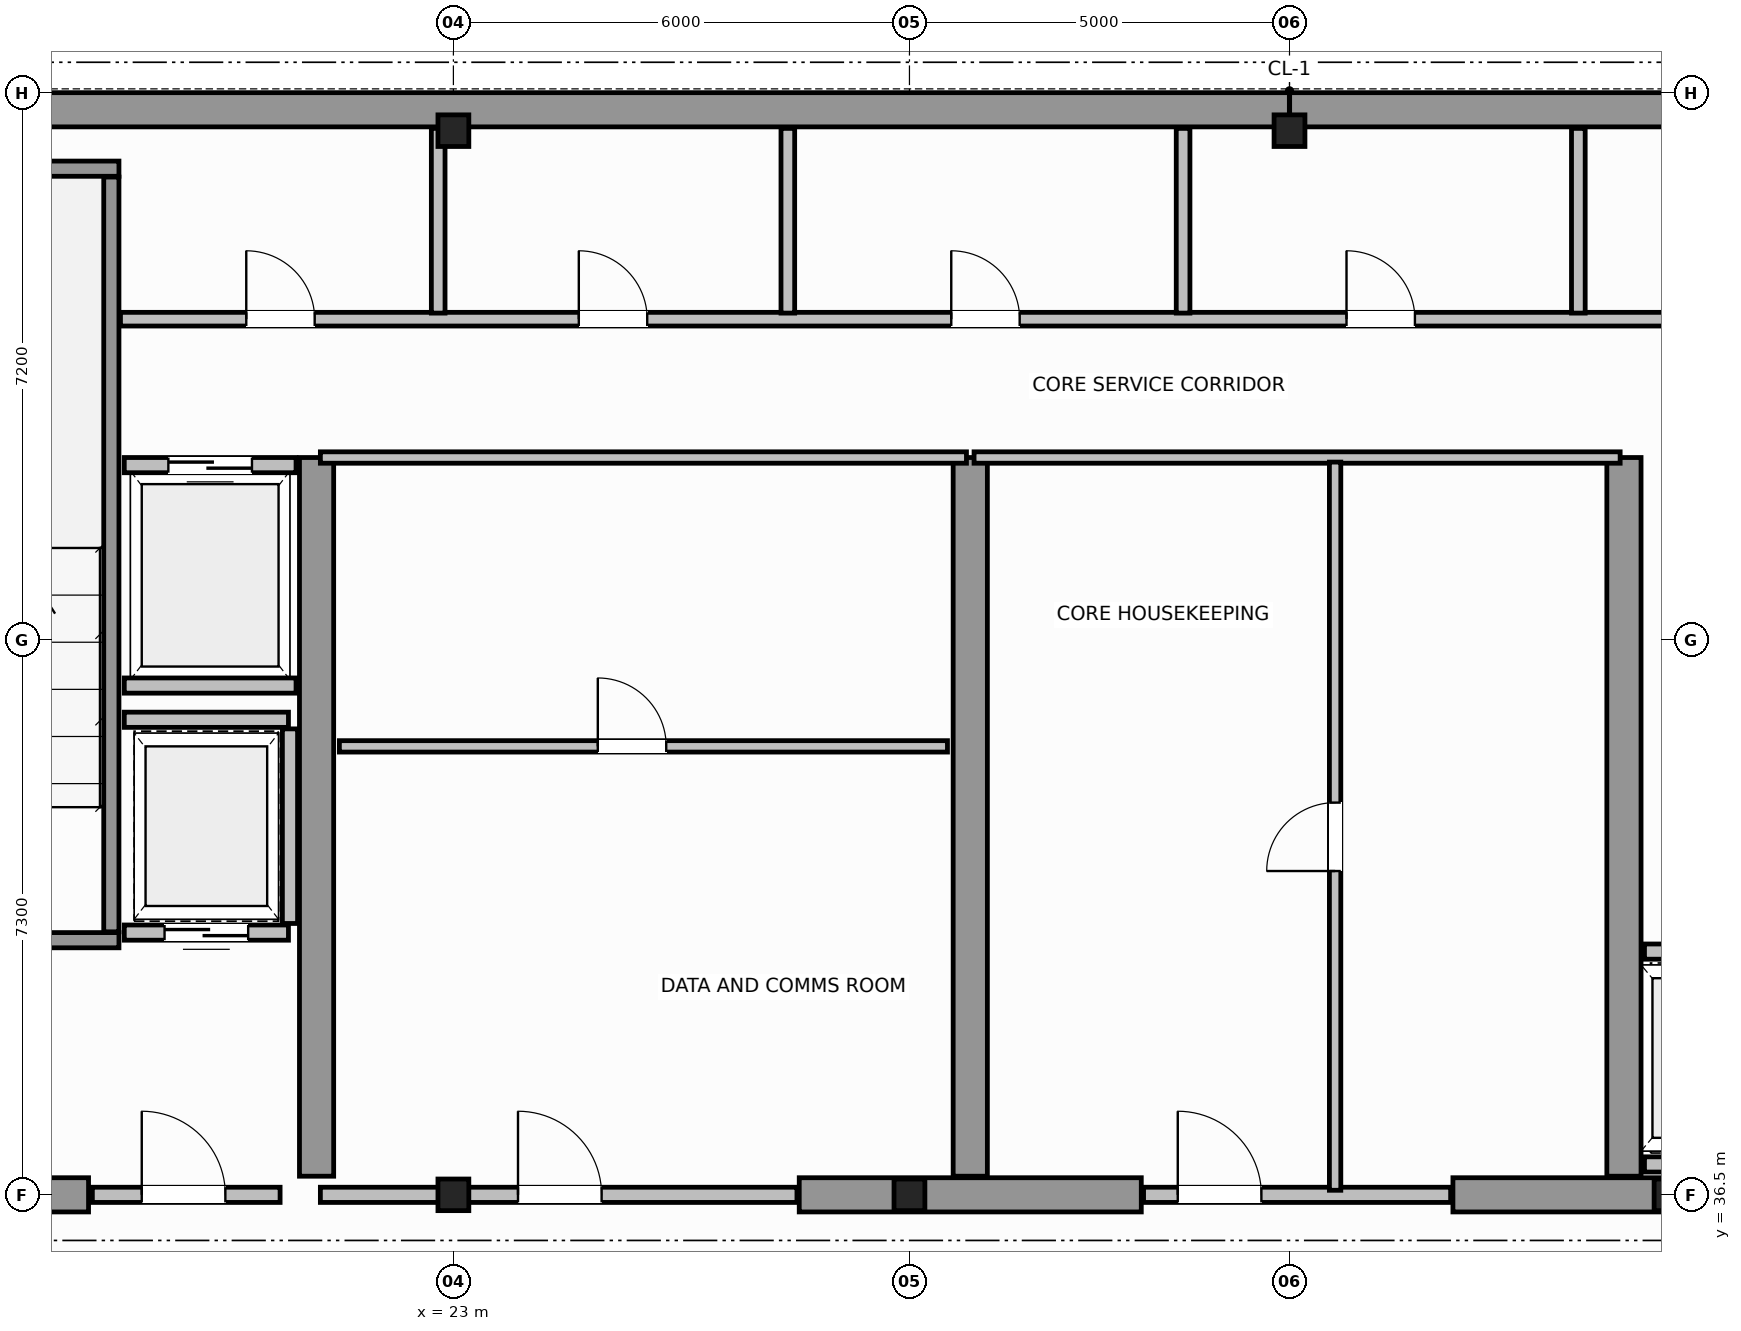
"""IFC4 building model, lengths in metres.
Left out: names, types, materials, properties, quantities, classifications, styles, units other than length and angle.
Written with IfcOpenShell. Run it as: python <this file> out.ifc"""

import sys

from ifc_helpers import new_model, si_unit, direction, frame, frame_2d, origin, origin_2d, place, context, subcontext, project, spatial, rectangle, i_section, extrude, source, transform, mapped, element, fill, save


model = new_model("IFC4")
c1 = context("Model", 3, precision=1e-05, world=origin(), true_north=direction((0.0, 1.0)))
c2 = subcontext(c1, "Body", "Model", "MODEL_VIEW")
j1 = project(units=[si_unit("LENGTHUNIT", "METRE"), si_unit("PLANEANGLEUNIT", "RADIAN")], contexts=[c1])
p1 = place(None, origin())
s1 = spatial("IfcSite", under=j1, at=p1, CompositionType="ELEMENT")
p2 = place(p1, origin())
s2 = spatial("IfcBuilding", under=s1, at=p2, CompositionType="ELEMENT")
p3 = place(p2, frame((0.0, 0.0, 295.4)))
s3 = spatial("IfcBuildingStorey", under=s2, at=p3, CompositionType="ELEMENT", Elevation=295.4)
m1 = source(origin(), c2, "Body", "SweptSolid", [
    extrude(i_section(OverallWidth=0.406, OverallDepth=0.416, WebThickness=0.03, FlangeThickness=0.042, FilletRadius=0.015, at=origin_2d()), origin(), (0.0, 0.0, 1.0), 3.8),
])
for number, where, z_axis, x_axis in (
    (1, (23.0, 36.5, 0.0), (0.0, 0.0, 1.0), (1.0, 0.0, 0.0)),
    (2, (29.0, 36.5, 0.0), (0.0, 0.0, 1.0), (1.0, 0.0, 0.0)),
    (3, (39.0, 36.5, 0.0), (0.0, 0.0, 1.0), (1.0, 0.0, 0.0)),
    (4, (23.0, 50.5, 0.0), (0.0, 0.0, 1.0), (1.0, 0.0, 0.0)),
    (5, (34.0, 50.5, 0.0), (0.0, 0.0, 1.0), (1.0, 0.0, 0.0)),
):
    element("IfcColumn", number, at=place(p3, frame(where, z_axis=z_axis, x_axis=x_axis)), inside=s3, PredefinedType="COLUMN", context=c2, shape_type="MappedRepresentation", body=[
        mapped(m1, transform((0.0, 0.0, 0.0), scale=1.0)),
    ])
for number, where, z_axis, x_axis in (
    (6, (14.229, 50.775, 0.0), (0.0, 0.0, 1.0), (1.0, 0.0, 0.0)),
    (7, (34.002, 50.775, 0.0), (0.0, 0.0, 1.0), (1.0, 0.0, 0.0)),
):
    element("IfcWall", number, at=place(p3, frame(where, z_axis=z_axis, x_axis=x_axis)), inside=s3, PredefinedType="SHEAR", context=c2, shape_type="SweptSolid", body=[
        extrude(rectangle(XDim=19.769, YDim=0.45, at=frame_2d((9.885, 0.0))), origin(), (0.0, 0.0, 1.0), 3.8),
    ])
p4 = place(p3, frame((14.245, 36.5, 0.0), z_axis=(0.0, 0.0, 1.0), x_axis=(1.0, 0.0, 0.0)))
e8 = element("IfcWall", 8, at=p4, inside=s3, PredefinedType="SHEAR", context=c2, shape_type="SweptSolid", body=[
    extrude(rectangle(XDim=3.955, YDim=0.45, at=frame_2d((1.978, 0.0))), origin(), (0.0, 0.0, 1.0), 2.58),
])
for number, where, z_axis, x_axis in (
    (9, (27.55, 36.5, 0.0), (0.0, 0.0, 1.0), (1.0, 0.0, 0.0)),
    (10, (36.15, 36.5, 0.0), (0.0, 0.0, 1.0), (1.0, 0.0, 0.0)),
):
    element("IfcWall", number, at=place(p3, frame(where, z_axis=z_axis, x_axis=x_axis)), inside=s3, PredefinedType="SHEAR", context=c2, shape_type="SweptSolid", body=[
        extrude(rectangle(XDim=4.5, YDim=0.45, at=frame_2d((2.25, 0.0))), origin(), (0.0, 0.0, 1.0), 3.8),
    ])
for number, where, z_axis, x_axis in (
    (11, (21.2, 36.745, 0.0), (0.0, 0.0, 1.0), (0.0, 1.0, 0.0)),
    (12, (29.8, 36.745, 0.0), (0.0, 0.0, 1.0), (0.0, 1.0, 0.0)),
    (13, (38.4, 36.745, 0.0), (0.0, 0.0, 1.0), (0.0, 1.0, 0.0)),
):
    element("IfcWall", number, at=place(p3, frame(where, z_axis=z_axis, x_axis=x_axis)), inside=s3, PredefinedType="SHEAR", context=c2, shape_type="SweptSolid", body=[
        extrude(rectangle(XDim=9.455, YDim=0.45, at=frame_2d((4.728, 0.0))), origin(), (0.0, 0.0, 1.0), 3.8),
    ])
p5 = place(p3, frame((14.225, 39.85, 0.0), z_axis=(0.0, 0.0, 1.0), x_axis=(1.0, 0.0, 0.0)))
e14 = element("IfcWall", 14, at=p5, inside=s3, PredefinedType="SOLIDWALL", context=c2, shape_type="SweptSolid", body=[
    extrude(rectangle(XDim=4.375, YDim=0.2, at=frame_2d((2.188, 0.0))), origin(), (0.0, 0.0, 1.0), 3.8),
])
p6 = place(p5, frame((1.95, 0.0, 0.0)))
e15 = element("IfcOpeningElement", 15, at=p6, cuts=e14, PredefinedType="OPENING", context=c2, shape_type="SweptSolid", body=[
    extrude(rectangle(XDim=1.1, YDim=2.15, at=frame_2d((0.55, 1.075))), frame((0.0, 0.11, 0.0), z_axis=(0.0, -1.0, 0.0), x_axis=(1.0, 0.0, 0.0)), (0.0, 0.0, 1.0), 0.22),
])
p7 = place(p3, frame((14.225, 50.0, 0.0), z_axis=(0.0, 0.0, 1.0), x_axis=(1.0, 0.0, 0.0)))
e16 = element("IfcWall", 16, at=p7, inside=s3, PredefinedType="SOLIDWALL", context=c2, shape_type="SweptSolid", body=[
    extrude(rectangle(XDim=4.375, YDim=0.2, at=frame_2d((2.188, 0.0))), origin(), (0.0, 0.0, 1.0), 3.8),
])
p8 = place(p3, frame((18.5, 39.96, 0.0), z_axis=(0.0, 0.0, 1.0), x_axis=(0.0, 1.0, 0.0)))
e17 = element("IfcWall", 17, at=p8, inside=s3, PredefinedType="SOLIDWALL", context=c2, shape_type="SweptSolid", body=[
    extrude(rectangle(XDim=9.93, YDim=0.2, at=frame_2d((4.965, 0.0))), origin(), (0.0, 0.0, 1.0), 3.8),
])
p9 = place(p3, frame((18.25, 36.5, 0.0), z_axis=(0.0, 0.0, 1.0), x_axis=(1.0, 0.0, 0.0)))
e18 = element("IfcWall", 18, at=p9, inside=s3, PredefinedType="SOLIDWALL", context=c2, shape_type="SweptSolid", body=[
    extrude(rectangle(XDim=2.47, YDim=0.2, at=frame_2d((1.235, 0.0))), origin(), (0.0, 0.0, 1.0), 2.57),
])
p10 = place(p9, frame((0.65, 0.0, 0.0)))
e19 = element("IfcOpeningElement", 19, at=p10, cuts=e18, PredefinedType="OPENING", context=c2, shape_type="SweptSolid", body=[
    extrude(rectangle(XDim=1.1, YDim=2.15, at=frame_2d((0.55, 1.075))), frame((0.0, 0.11, 0.0), z_axis=(0.0, -1.0, 0.0), x_axis=(1.0, 0.0, 0.0)), (0.0, 0.0, 1.0), 0.22),
])
p11 = place(p3, frame((38.67, 39.7, 0.0), z_axis=(0.0, 0.0, 1.0), x_axis=(1.0, 0.0, 0.0)))
e20 = element("IfcWall", 20, at=p11, inside=s3, PredefinedType="SOLIDWALL", context=c2, shape_type="SweptSolid", body=[
    extrude(rectangle(XDim=1.96, YDim=0.2, at=frame_2d((0.98, 0.0))), origin(), (0.0, 0.0, 1.0), 3.58),
])
p12 = place(p11, frame((0.43, 0.0, 0.0)))
e21 = element("IfcOpeningElement", 21, at=p12, cuts=e20, PredefinedType="OPENING", context=c2, shape_type="SweptSolid", body=[
    extrude(rectangle(XDim=1.1, YDim=2.15, at=frame_2d((0.55, 1.075))), frame((0.0, 0.11, 0.0), z_axis=(0.0, -1.0, 0.0), x_axis=(1.0, 0.0, 0.0)), (0.0, 0.0, 1.0), 0.22),
])
p13 = place(p3, frame((38.67, 36.9, 0.0), z_axis=(0.0, 0.0, 1.0), x_axis=(1.0, 0.0, 0.0)))
e22 = element("IfcWall", 22, at=p13, inside=s3, PredefinedType="SOLIDWALL", context=c2, shape_type="SweptSolid", body=[
    extrude(rectangle(XDim=1.96, YDim=0.2, at=frame_2d((0.98, 0.0))), origin(), (0.0, 0.0, 1.0), 3.58),
])
p14 = place(p3, frame((18.67, 46.1, 0.0), z_axis=(0.0, 0.0, 1.0), x_axis=(1.0, 0.0, 0.0)))
e23 = element("IfcWall", 23, at=p14, inside=s3, PredefinedType="SOLIDWALL", context=c2, shape_type="SweptSolid", body=[
    extrude(rectangle(XDim=2.26, YDim=0.2, at=frame_2d((1.13, 0.0))), origin(), (0.0, 0.0, 1.0), 3.58),
])
p15 = place(p14, frame((0.58, 0.0, 0.0)))
e24 = element("IfcOpeningElement", 24, at=p15, cuts=e23, PredefinedType="OPENING", context=c2, shape_type="SweptSolid", body=[
    extrude(rectangle(XDim=1.1, YDim=2.15, at=frame_2d((0.55, 1.075))), frame((0.0, 0.11, 0.0), z_axis=(0.0, -1.0, 0.0), x_axis=(1.0, 0.0, 0.0)), (0.0, 0.0, 1.0), 0.22),
])
p16 = place(p3, frame((18.67, 43.2, 0.0), z_axis=(0.0, 0.0, 1.0), x_axis=(1.0, 0.0, 0.0)))
e25 = element("IfcWall", 25, at=p16, inside=s3, PredefinedType="SOLIDWALL", context=c2, shape_type="SweptSolid", body=[
    extrude(rectangle(XDim=2.26, YDim=0.2, at=frame_2d((1.13, 0.0))), origin(), (0.0, 0.0, 1.0), 3.58),
])
p17 = place(p3, frame((18.67, 39.95, 0.0), z_axis=(0.0, 0.0, 1.0), x_axis=(1.0, 0.0, 0.0)))
e26 = element("IfcWall", 26, at=p17, inside=s3, PredefinedType="SOLIDWALL", context=c2, shape_type="SweptSolid", body=[
    extrude(rectangle(XDim=2.16, YDim=0.2, at=frame_2d((1.08, 0.0))), origin(), (0.0, 0.0, 1.0), 3.58),
])
p18 = place(p17, frame((0.53, 0.0, 0.0)))
e27 = element("IfcOpeningElement", 27, at=p18, cuts=e26, PredefinedType="OPENING", context=c2, shape_type="SweptSolid", body=[
    extrude(rectangle(XDim=1.1, YDim=2.15, at=frame_2d((0.55, 1.075))), frame((0.0, 0.11, 0.0), z_axis=(0.0, -1.0, 0.0), x_axis=(1.0, 0.0, 0.0)), (0.0, 0.0, 1.0), 0.22),
])
p19 = place(p3, frame((18.67, 42.75, 0.0), z_axis=(0.0, 0.0, 1.0), x_axis=(1.0, 0.0, 0.0)))
e28 = element("IfcWall", 28, at=p19, inside=s3, PredefinedType="SOLIDWALL", context=c2, shape_type="SweptSolid", body=[
    extrude(rectangle(XDim=2.16, YDim=0.2, at=frame_2d((1.08, 0.0))), origin(), (0.0, 0.0, 1.0), 3.58),
])
p20 = place(p3, frame((20.85, 40.07, 0.0), z_axis=(0.0, 0.0, 1.0), x_axis=(0.0, 1.0, 0.0)))
e29 = element("IfcWall", 29, at=p20, inside=s3, PredefinedType="SOLIDWALL", context=c2, shape_type="SweptSolid", body=[
    extrude(rectangle(XDim=2.56, YDim=0.2, at=frame_2d((1.28, 0.0))), origin(), (0.0, 0.0, 1.0), 3.58),
])
p21 = place(p3, frame((21.25, 36.5, 0.0), z_axis=(0.0, 0.0, 1.0), x_axis=(1.0, 0.0, 0.0)))
e30 = element("IfcWall", 30, at=p21, inside=s3, PredefinedType="SOLIDWALL", context=c2, shape_type="SweptSolid", body=[
    extrude(rectangle(XDim=6.27, YDim=0.2, at=frame_2d((3.135, 0.0))), origin(), (0.0, 0.0, 1.0), 2.57),
])
p22 = place(p21, frame((2.6, 0.0, 0.0)))
e31 = element("IfcOpeningElement", 31, at=p22, cuts=e30, PredefinedType="OPENING", context=c2, shape_type="SweptSolid", body=[
    extrude(rectangle(XDim=1.1, YDim=2.15, at=frame_2d((0.55, 1.075))), frame((0.0, 0.11, 0.0), z_axis=(0.0, -1.0, 0.0), x_axis=(1.0, 0.0, 0.0)), (0.0, 0.0, 1.0), 0.22),
])
p23 = place(p3, frame((21.25, 46.2, 0.0), z_axis=(0.0, 0.0, 1.0), x_axis=(1.0, 0.0, 0.0)))
e32 = element("IfcWall", 32, at=p23, inside=s3, PredefinedType="PARTITIONING", context=c2, shape_type="SweptSolid", body=[
    extrude(rectangle(XDim=8.5, YDim=0.15, at=frame_2d((4.25, 0.0))), origin(), (0.0, 0.0, 1.0), 3.58),
])
p24 = place(p3, frame((21.5, 42.4, 0.0), z_axis=(0.0, 0.0, 1.0), x_axis=(1.0, 0.0, 0.0)))
e33 = element("IfcWall", 33, at=p24, inside=s3, PredefinedType="PARTITIONING", context=c2, shape_type="SweptSolid", body=[
    extrude(rectangle(XDim=8.0, YDim=0.15, at=frame_2d((4.0, 0.0))), origin(), (0.0, 0.0, 1.0), 3.58),
])
p25 = place(p24, frame((3.4, 0.0, 0.0)))
e34 = element("IfcOpeningElement", 34, at=p25, cuts=e33, PredefinedType="OPENING", context=c2, shape_type="SweptSolid", body=[
    extrude(rectangle(XDim=0.9, YDim=2.1, at=frame_2d((0.45, 1.05))), frame((0.0, 0.085, 0.0), z_axis=(0.0, -1.0, 0.0), x_axis=(1.0, 0.0, 0.0)), (0.0, 0.0, 1.0), 0.17),
])
p26 = place(p3, frame((32.08, 36.5, 0.0), z_axis=(0.0, 0.0, 1.0), x_axis=(1.0, 0.0, 0.0)))
e35 = element("IfcWall", 35, at=p26, inside=s3, PredefinedType="SOLIDWALL", context=c2, shape_type="SweptSolid", body=[
    extrude(rectangle(XDim=4.04, YDim=0.2, at=frame_2d((2.02, 0.0))), origin(), (0.0, 0.0, 1.0), 3.12),
])
p27 = place(p26, frame((0.45, 0.0, 0.0)))
e36 = element("IfcOpeningElement", 36, at=p27, cuts=e35, PredefinedType="OPENING", context=c2, shape_type="SweptSolid", body=[
    extrude(rectangle(XDim=1.1, YDim=2.15, at=frame_2d((0.55, 1.075))), frame((0.0, 0.11, 0.0), z_axis=(0.0, -1.0, 0.0), x_axis=(1.0, 0.0, 0.0)), (0.0, 0.0, 1.0), 0.22),
])
p28 = place(p3, frame((29.85, 46.2, 0.0), z_axis=(0.0, 0.0, 1.0), x_axis=(1.0, 0.0, 0.0)))
e37 = element("IfcWall", 37, at=p28, inside=s3, PredefinedType="PARTITIONING", context=c2, shape_type="SweptSolid", body=[
    extrude(rectangle(XDim=8.5, YDim=0.15, at=frame_2d((4.25, 0.0))), origin(), (0.0, 0.0, 1.0), 3.58),
])
p29 = place(p3, frame((34.6, 36.56, 0.0), z_axis=(0.0, 0.0, 1.0), x_axis=(0.0, 1.0, 0.0)))
e38 = element("IfcWall", 38, at=p29, inside=s3, PredefinedType="PARTITIONING", context=c2, shape_type="SweptSolid", body=[
    extrude(rectangle(XDim=9.58, YDim=0.15, at=frame_2d((4.79, 0.0))), origin(), (0.0, 0.0, 1.0), 3.58),
])
p30 = place(p29, frame((4.2, 0.0, 0.0)))
e39 = element("IfcOpeningElement", 39, at=p30, cuts=e38, PredefinedType="OPENING", context=c2, shape_type="SweptSolid", body=[
    extrude(rectangle(XDim=0.9, YDim=2.1, at=frame_2d((0.45, 1.05))), frame((0.0, 0.085, 0.0), z_axis=(0.0, -1.0, 0.0), x_axis=(1.0, 0.0, 0.0)), (0.0, 0.0, 1.0), 0.17),
])
p31 = place(p3, frame((18.62, 48.02, 0.0), z_axis=(0.0, 0.0, 1.0), x_axis=(1.0, 0.0, 0.0)))
e40 = element("IfcWall", 40, at=p31, inside=s3, PredefinedType="PLUMBINGWALL", context=c2, shape_type="SweptSolid", body=[
    extrude(rectangle(XDim=30.76, YDim=0.18, at=frame_2d((15.38, 0.0))), origin(), (0.0, 0.0, 1.0), 3.58),
])
p32 = place(p31, frame((1.655, 0.0, 0.0)))
e41 = element("IfcOpeningElement", 41, at=p32, cuts=e40, PredefinedType="OPENING", context=c2, shape_type="SweptSolid", body=[
    extrude(rectangle(XDim=0.9, YDim=2.15, at=frame_2d((0.45, 1.075))), frame((0.0, 0.1, 0.0), z_axis=(0.0, -1.0, 0.0), x_axis=(1.0, 0.0, 0.0)), (0.0, 0.0, 1.0), 0.2),
])
p33 = place(p31, frame((6.03, 0.0, 0.0)))
e42 = element("IfcOpeningElement", 42, at=p33, cuts=e40, PredefinedType="OPENING", context=c2, shape_type="SweptSolid", body=[
    extrude(rectangle(XDim=0.9, YDim=2.15, at=frame_2d((0.45, 1.075))), frame((0.0, 0.1, 0.0), z_axis=(0.0, -1.0, 0.0), x_axis=(1.0, 0.0, 0.0)), (0.0, 0.0, 1.0), 0.2),
])
p34 = place(p31, frame((10.93, 0.0, 0.0)))
e43 = element("IfcOpeningElement", 43, at=p34, cuts=e40, PredefinedType="OPENING", context=c2, shape_type="SweptSolid", body=[
    extrude(rectangle(XDim=0.9, YDim=2.15, at=frame_2d((0.45, 1.075))), frame((0.0, 0.1, 0.0), z_axis=(0.0, -1.0, 0.0), x_axis=(1.0, 0.0, 0.0)), (0.0, 0.0, 1.0), 0.2),
])
p35 = place(p31, frame((16.13, 0.0, 0.0)))
e44 = element("IfcOpeningElement", 44, at=p35, cuts=e40, PredefinedType="OPENING", context=c2, shape_type="SweptSolid", body=[
    extrude(rectangle(XDim=0.9, YDim=2.15, at=frame_2d((0.45, 1.075))), frame((0.0, 0.1, 0.0), z_axis=(0.0, -1.0, 0.0), x_axis=(1.0, 0.0, 0.0)), (0.0, 0.0, 1.0), 0.2),
])
p36 = place(p31, frame((21.73, 0.0, 0.0)))
e45 = element("IfcOpeningElement", 45, at=p36, cuts=e40, PredefinedType="OPENING", context=c2, shape_type="SweptSolid", body=[
    extrude(rectangle(XDim=0.9, YDim=2.15, at=frame_2d((0.45, 1.075))), frame((0.0, 0.1, 0.0), z_axis=(0.0, -1.0, 0.0), x_axis=(1.0, 0.0, 0.0)), (0.0, 0.0, 1.0), 0.2),
])
p37 = place(p31, frame((27.505, 0.0, 0.0)))
e46 = element("IfcOpeningElement", 46, at=p37, cuts=e40, PredefinedType="OPENING", context=c2, shape_type="SweptSolid", body=[
    extrude(rectangle(XDim=0.9, YDim=2.15, at=frame_2d((0.45, 1.075))), frame((0.0, 0.1, 0.0), z_axis=(0.0, -1.0, 0.0), x_axis=(1.0, 0.0, 0.0)), (0.0, 0.0, 1.0), 0.2),
])
p38 = place(p3, frame((22.8, 48.1, 0.0), z_axis=(0.0, 0.0, 1.0), x_axis=(0.0, 1.0, 0.0)))
e47 = element("IfcWall", 47, at=p38, inside=s3, PredefinedType="PLUMBINGWALL", context=c2, shape_type="SweptSolid", body=[
    extrude(rectangle(XDim=2.43, YDim=0.18, at=frame_2d((1.215, 0.0))), origin(), (0.0, 0.0, 1.0), 3.12),
])
for number, where, z_axis, x_axis in (
    (48, (27.4, 48.1, 0.0), (0.0, 0.0, 1.0), (0.0, 1.0, 0.0)),
    (49, (32.6, 48.1, 0.0), (0.0, 0.0, 1.0), (0.0, 1.0, 0.0)),
    (50, (37.8, 48.1, 0.0), (0.0, 0.0, 1.0), (0.0, 1.0, 0.0)),
):
    element("IfcWall", number, at=place(p3, frame(where, z_axis=z_axis, x_axis=x_axis)), inside=s3, PredefinedType="PLUMBINGWALL", context=c2, shape_type="SweptSolid", body=[
        extrude(rectangle(XDim=2.43, YDim=0.18, at=frame_2d((1.215, 0.0))), origin(), (0.0, 0.0, 1.0), 3.58),
    ])
m2 = source(origin(), c2, "Body", "SweptSolid", [
    extrude(rectangle(XDim=1.1, YDim=2.15, at=frame_2d((0.55, 1.075))), frame((0.0, 0.025, 0.0), z_axis=(0.0, -1.0, 0.0), x_axis=(1.0, 0.0, 0.0)), (0.0, 0.0, 1.0), 0.05),
])
p39 = place(p10, origin())
e51 = element("IfcDoor", 51, at=p39, inside=s3, OperationType="SINGLE_SWING_RIGHT", PredefinedType="DOOR", context=c2, shape_type="MappedRepresentation", body=[
    mapped(m2, transform((0.0, 0.0, 0.0), scale=1.0)),
])
fill(e19, e51)
p40 = place(p15, origin())
e52 = element("IfcDoor", 52, at=p40, inside=s3, OperationType="DOUBLE_DOOR_SLIDING", PredefinedType="DOOR", context=c2, shape_type="MappedRepresentation", body=[
    mapped(m2, transform((0.0, 0.0, 0.0), scale=1.0)),
])
fill(e24, e52)
p41 = place(p18, origin())
e53 = element("IfcDoor", 53, at=p41, inside=s3, OperationType="DOUBLE_DOOR_SLIDING", PredefinedType="DOOR", context=c2, shape_type="MappedRepresentation", body=[
    mapped(m2, transform((0.0, 0.0, 0.0), scale=1.0)),
])
fill(e27, e53)
p42 = place(p22, origin())
e54 = element("IfcDoor", 54, at=p42, inside=s3, OperationType="SINGLE_SWING_LEFT", PredefinedType="DOOR", context=c2, shape_type="MappedRepresentation", body=[
    mapped(m2, transform((0.0, 0.0, 0.0), scale=1.0)),
])
fill(e31, e54)
m3 = source(origin(), c2, "Body", "SweptSolid", [
    extrude(rectangle(XDim=0.9, YDim=2.1, at=frame_2d((0.45, 1.05))), frame((0.0, 0.025, 0.0), z_axis=(0.0, -1.0, 0.0), x_axis=(1.0, 0.0, 0.0)), (0.0, 0.0, 1.0), 0.05),
])
p43 = place(p25, origin())
e55 = element("IfcDoor", 55, at=p43, inside=s3, OperationType="SINGLE_SWING_RIGHT", PredefinedType="DOOR", context=c2, shape_type="MappedRepresentation", body=[
    mapped(m3, transform((0.0, 0.0, 0.0), scale=1.0)),
])
fill(e34, e55)
p44 = place(p27, origin())
e56 = element("IfcDoor", 56, at=p44, inside=s3, OperationType="SINGLE_SWING_LEFT", PredefinedType="DOOR", context=c2, shape_type="MappedRepresentation", body=[
    mapped(m2, transform((0.0, 0.0, 0.0), scale=1.0)),
])
fill(e36, e56)
p45 = place(p30, origin())
e57 = element("IfcDoor", 57, at=p45, inside=s3, OperationType="SINGLE_SWING_RIGHT", PredefinedType="DOOR", context=c2, shape_type="MappedRepresentation", body=[
    mapped(m3, transform((0.0, 0.0, 0.0), scale=1.0)),
])
fill(e39, e57)
m4 = source(origin(), c2, "Body", "SweptSolid", [
    extrude(rectangle(XDim=0.9, YDim=2.15, at=frame_2d((0.45, 1.075))), frame((0.0, 0.025, 0.0), z_axis=(0.0, -1.0, 0.0), x_axis=(1.0, 0.0, 0.0)), (0.0, 0.0, 1.0), 0.05),
])
p46 = place(p32, origin())
e58 = element("IfcDoor", 58, at=p46, inside=s3, OperationType="SINGLE_SWING_LEFT", PredefinedType="DOOR", context=c2, shape_type="MappedRepresentation", body=[
    mapped(m4, transform((0.0, 0.0, 0.0), scale=1.0)),
])
fill(e41, e58)
p47 = place(p33, origin())
e59 = element("IfcDoor", 59, at=p47, inside=s3, OperationType="SINGLE_SWING_RIGHT", PredefinedType="DOOR", context=c2, shape_type="MappedRepresentation", body=[
    mapped(m4, transform((0.0, 0.0, 0.0), scale=1.0)),
])
fill(e42, e59)
p48 = place(p34, origin())
e60 = element("IfcDoor", 60, at=p48, inside=s3, OperationType="SINGLE_SWING_LEFT", PredefinedType="DOOR", context=c2, shape_type="MappedRepresentation", body=[
    mapped(m4, transform((0.0, 0.0, 0.0), scale=1.0)),
])
fill(e43, e60)
p49 = place(p35, origin())
e61 = element("IfcDoor", 61, at=p49, inside=s3, OperationType="SINGLE_SWING_RIGHT", PredefinedType="DOOR", context=c2, shape_type="MappedRepresentation", body=[
    mapped(m4, transform((0.0, 0.0, 0.0), scale=1.0)),
])
fill(e44, e61)
save(model, sys.argv[1])
